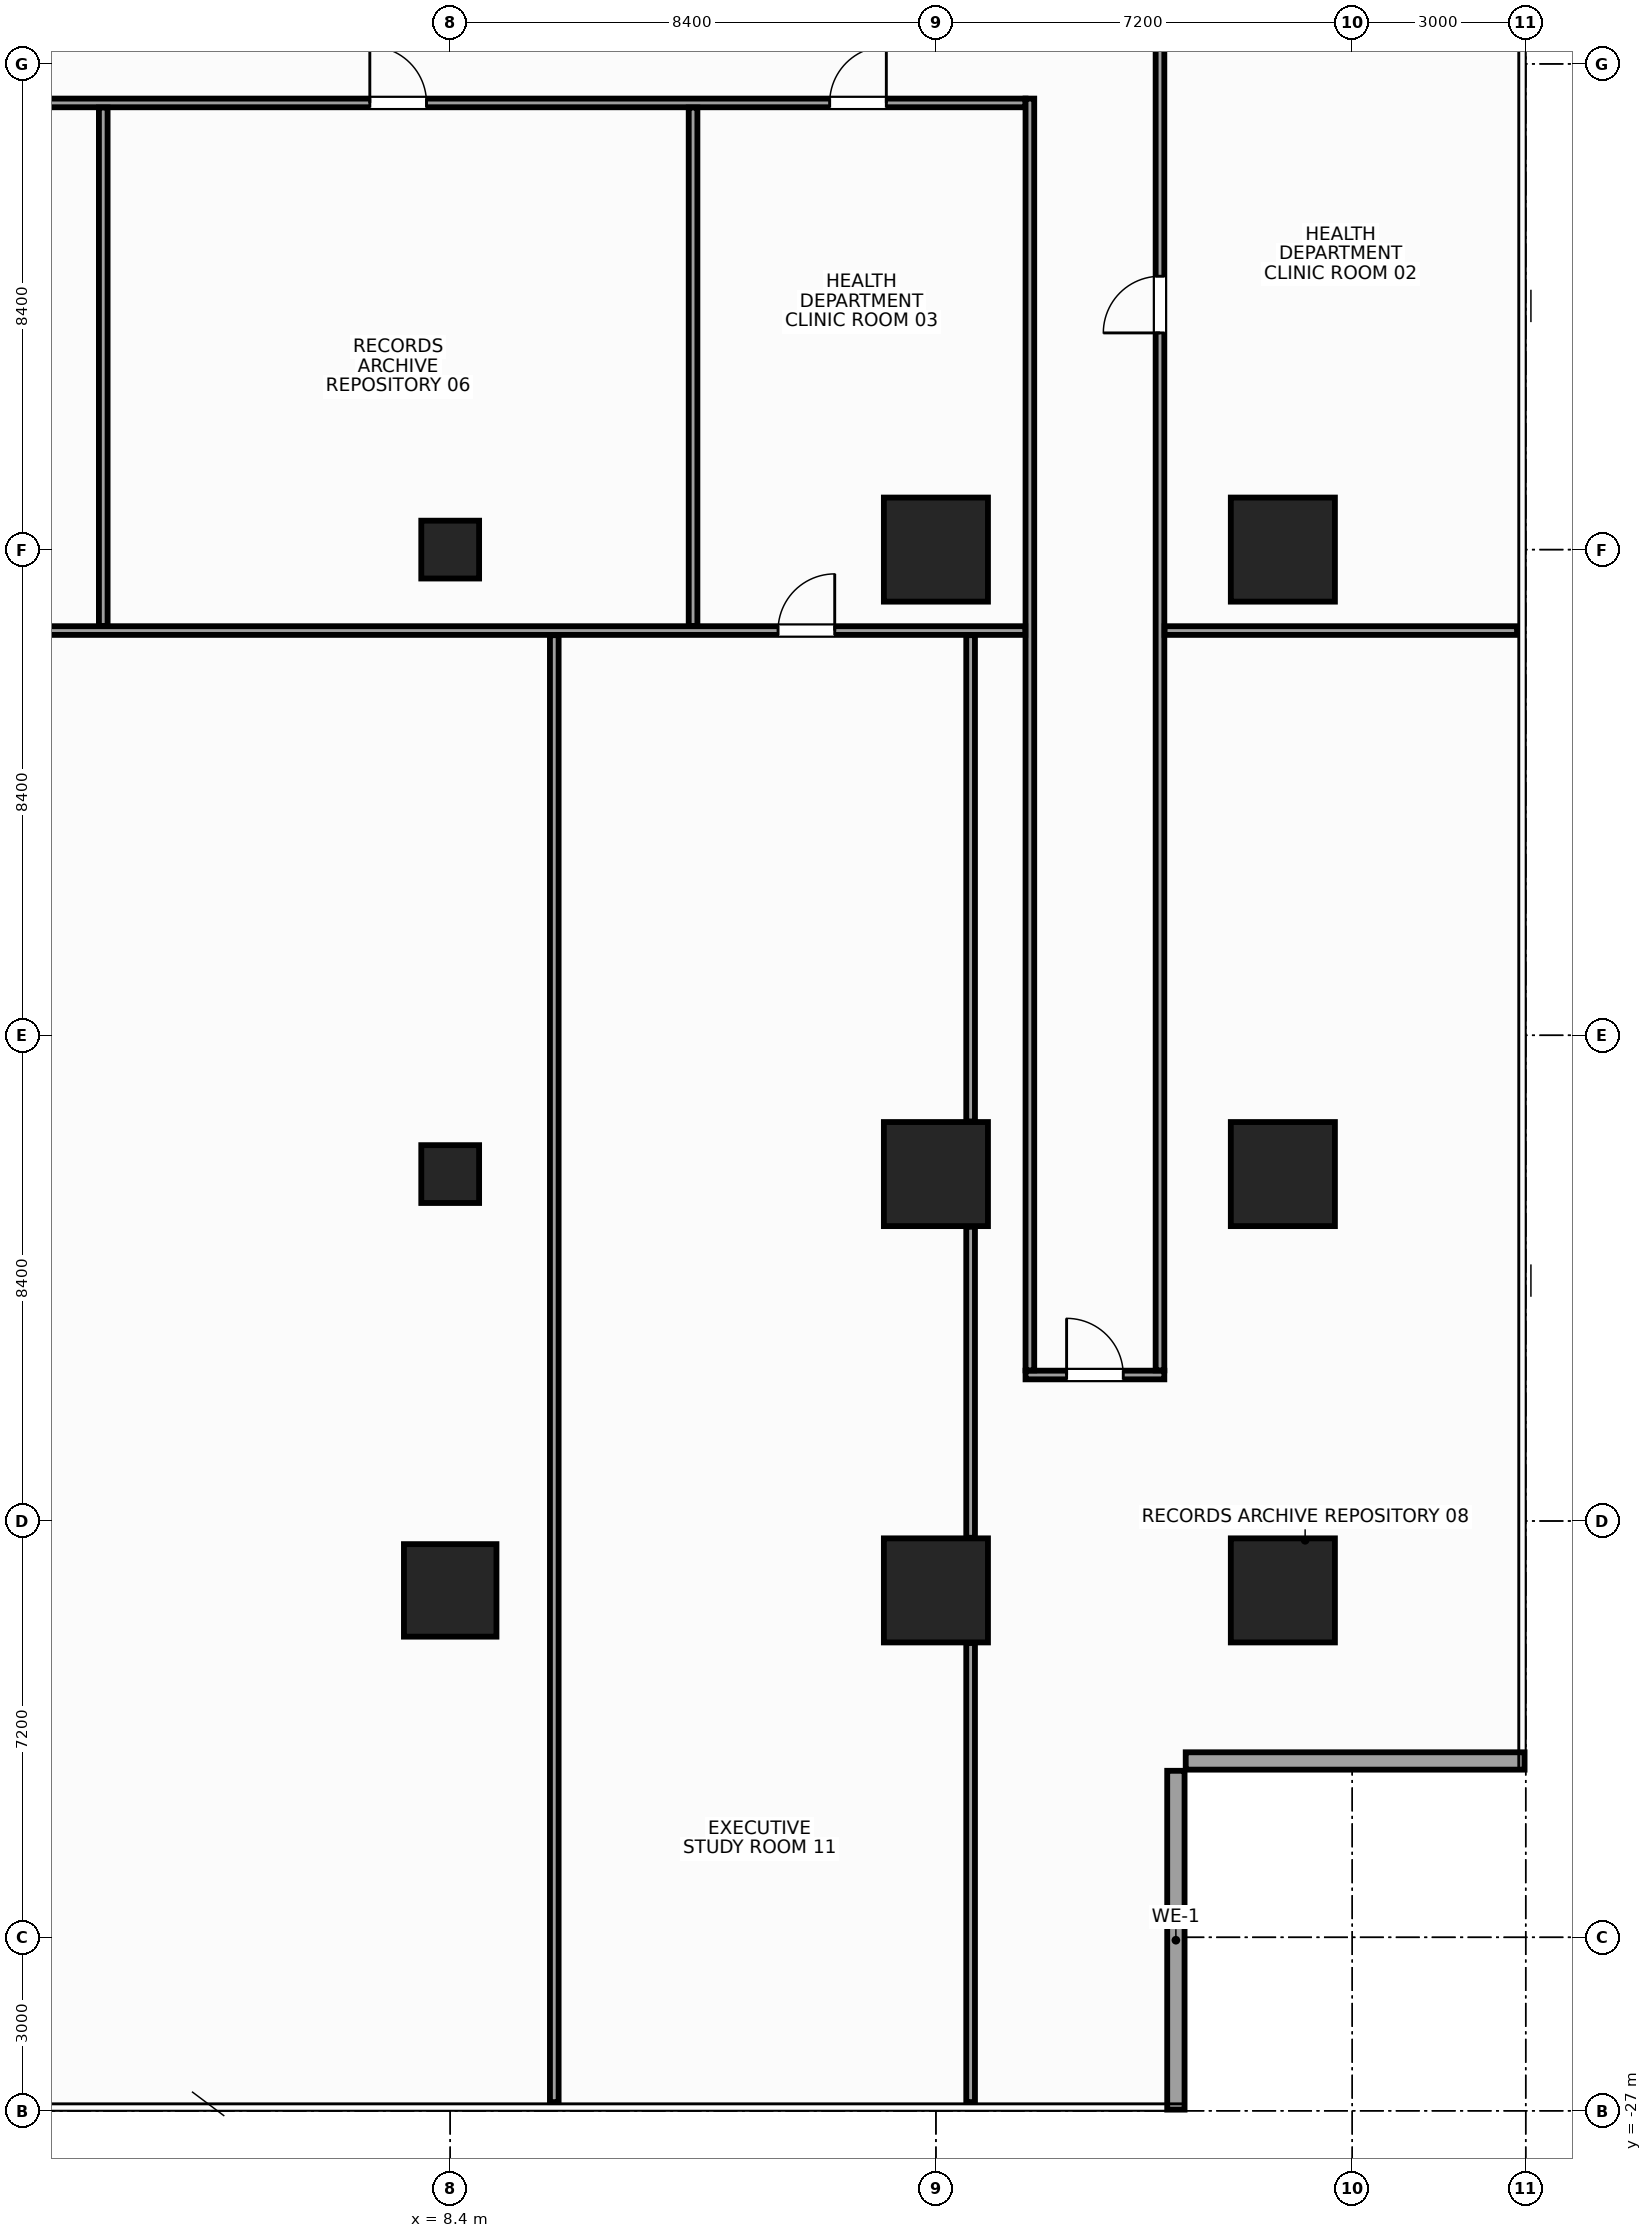
"""IFC4 building model, lengths in metres.
Left out: names, types, materials, properties, quantities, classifications, styles, units other than length and angle.
Written with IfcOpenShell. Run it as: python <this file> out.ifc"""

import sys

from ifc_helpers import new_model, si_unit, direction, frame, frame_2d, origin, origin_2d, place, context, subcontext, project, spatial, rectangle, hollow_rectangle, extrude, source, transform, mapped, element, fill, save


model = new_model("IFC4")
c1 = context("Model", 3, precision=1e-05, world=origin(), true_north=direction((0.0, 1.0)))
c2 = subcontext(c1, "Body", "Model", "MODEL_VIEW")
j1 = project(units=[si_unit("LENGTHUNIT", "METRE"), si_unit("PLANEANGLEUNIT", "RADIAN")], contexts=[c1])
p1 = place(None, origin())
s1 = spatial("IfcSite", under=j1, at=p1, CompositionType="ELEMENT")
p2 = place(p1, origin())
s2 = spatial("IfcBuilding", under=s1, at=p2, CompositionType="ELEMENT")
p3 = place(p2, frame((0.0, 0.0, 45.2)))
s3 = spatial("IfcBuildingStorey", under=s2, at=p3, CompositionType="ELEMENT", Elevation=45.2)
m1 = source(origin(), c2, "Body", "SweptSolid", [
    extrude(rectangle(XDim=1.8, YDim=1.8, at=origin_2d()), origin(), (0.0, 0.0, 1.0), 3.6),
])
for number, where, z_axis, x_axis in (
    (1, (16.8, -18.0, 0.0), (0.0, 0.0, 1.0), (1.0, 0.0, 0.0)),
    (2, (16.8, -10.8, 0.0), (0.0, 0.0, 1.0), (1.0, 0.0, 0.0)),
    (3, (16.8, 0.0, 0.0), (0.0, 0.0, 1.0), (1.0, 0.0, 0.0)),
    (4, (22.8, -18.0, 0.0), (0.0, 0.0, 1.0), (1.0, 0.0, 0.0)),
    (5, (22.8, -10.8, 0.0), (0.0, 0.0, 1.0), (1.0, 0.0, 0.0)),
    (6, (22.8, 0.0, 0.0), (0.0, 0.0, 1.0), (1.0, 0.0, 0.0)),
):
    element("IfcColumn", number, at=place(p3, frame(where, z_axis=z_axis, x_axis=x_axis)), inside=s3, PredefinedType="COLUMN", context=c2, shape_type="MappedRepresentation", body=[
        mapped(m1, transform((0.0, 0.0, 0.0), x_axis=(1.0, 0.0, 0.0), y_axis=(0.0, 1.0, 0.0), z_axis=(0.0, 0.0, 1.0), scale=1.0)),
    ])
m2 = source(origin(), c2, "Body", "SweptSolid", [
    extrude(rectangle(XDim=1.6, YDim=1.6, at=origin_2d()), origin(), (0.0, 0.0, 1.0), 3.6),
])
p4 = place(p3, frame((8.4, -18.0, 0.0), z_axis=(0.0, 0.0, 1.0), x_axis=(1.0, 0.0, 0.0)))
e7 = element("IfcColumn", 7, at=p4, inside=s3, PredefinedType="COLUMN", context=c2, shape_type="MappedRepresentation", body=[
    mapped(m2, transform((0.0, 0.0, 0.0), x_axis=(1.0, 0.0, 0.0), y_axis=(0.0, 1.0, 0.0), z_axis=(0.0, 0.0, 1.0), scale=1.0)),
])
m3 = source(origin(), c2, "Body", "SweptSolid", [
    extrude(hollow_rectangle(XDim=1.0, YDim=1.0, WallThickness=0.045, at=origin_2d()), origin(), (0.0, 0.0, 1.0), 3.6),
])
for number, where, z_axis, x_axis in (
    (8, (8.4, 0.0, 0.0), (0.0, 0.0, 1.0), (1.0, 0.0, 0.0)),
    (9, (8.4, -10.8, 0.0), (0.0, 0.0, 1.0), (1.0, 0.0, 0.0)),
):
    element("IfcColumn", number, at=place(p3, frame(where, z_axis=z_axis, x_axis=x_axis)), inside=s3, PredefinedType="COLUMN", context=c2, shape_type="MappedRepresentation", body=[
        mapped(m3, transform((0.0, 0.0, 0.0), x_axis=(1.0, 0.0, 0.0), y_axis=(0.0, 1.0, 0.0), z_axis=(0.0, 0.0, 1.0), scale=1.0)),
    ])
m4 = source(origin(), c2, "Body", "SweptSolid", [
    extrude(rectangle(XDim=5.86, YDim=0.3, at=frame_2d((2.93, 0.0))), origin(), (0.0, 0.0, 1.0), 2.74),
])
for number, where, z_axis, x_axis in (
    (10, (20.95, -26.98, 0.0), (0.0, 0.0, 1.0), (0.0, 1.0, 0.0)),
    (11, (21.12, -20.95, 0.0), (0.0, 0.0, 1.0), (1.0, 0.0, 0.0)),
):
    element("IfcWall", number, at=place(p3, frame(where, z_axis=z_axis, x_axis=x_axis)), inside=s3, PredefinedType="STANDARD", context=c2, shape_type="MappedRepresentation", body=[
        mapped(m4, transform((0.0, 0.0, 0.0), x_axis=(1.0, 0.0, 0.0), y_axis=(0.0, 1.0, 0.0), z_axis=(0.0, 0.0, 1.0), scale=1.0)),
    ])
m5 = source(origin(), c2, "Body", "SweptSolid", [
    extrude(rectangle(XDim=36.7, YDim=0.15, at=frame_2d((18.35, 0.0))), origin(), (0.0, 0.0, 1.0), 2.745),
])
p5 = place(p3, frame((-18.35, 7.725, 0.0), z_axis=(0.0, 0.0, 1.0), x_axis=(1.0, 0.0, 0.0)))
e12 = element("IfcWall", 12, at=p5, inside=s3, PredefinedType="PARTITIONING", context=c2, shape_type="MappedRepresentation", body=[
    mapped(m5, transform((0.0, 0.0, 0.0), x_axis=(1.0, 0.0, 0.0), y_axis=(0.0, 1.0, 0.0), z_axis=(0.0, 0.0, 1.0), scale=1.0)),
])
p6 = place(p5, frame((33.312, 0.0, 0.0)))
e13 = element("IfcOpeningElement", 13, at=p6, cuts=e12, PredefinedType="OPENING", context=c2, shape_type="SweptSolid", body=[
    extrude(rectangle(XDim=0.98, YDim=2.15, at=frame_2d((0.49, 1.075))), frame((0.0, 0.087, 0.0), z_axis=(0.0, -1.0, 0.0), x_axis=(1.0, 0.0, 0.0)), (0.0, 0.0, 1.0), 0.174),
])
p7 = place(p5, frame((4.107, 0.0, 0.0)))
e14 = element("IfcOpeningElement", 14, at=p7, cuts=e12, PredefinedType="OPENING", context=c2, shape_type="SweptSolid", body=[
    extrude(rectangle(XDim=0.98, YDim=2.15, at=frame_2d((0.49, 1.075))), frame((0.0, 0.087, 0.0), z_axis=(0.0, -1.0, 0.0), x_axis=(1.0, 0.0, 0.0)), (0.0, 0.0, 1.0), 0.174),
])
p8 = place(p5, frame((14.46, 0.0, 0.0)))
e15 = element("IfcOpeningElement", 15, at=p8, cuts=e12, PredefinedType="OPENING", context=c2, shape_type="SweptSolid", body=[
    extrude(rectangle(XDim=0.98, YDim=2.15, at=frame_2d((0.49, 1.075))), frame((0.0, 0.087, 0.0), z_axis=(0.0, -1.0, 0.0), x_axis=(1.0, 0.0, 0.0)), (0.0, 0.0, 1.0), 0.174),
])
p9 = place(p5, frame((25.36, 0.0, 0.0)))
e16 = element("IfcOpeningElement", 16, at=p9, cuts=e12, PredefinedType="OPENING", context=c2, shape_type="SweptSolid", body=[
    extrude(rectangle(XDim=0.98, YDim=2.15, at=frame_2d((0.49, 1.075))), frame((0.0, 0.087, 0.0), z_axis=(0.0, -1.0, 0.0), x_axis=(1.0, 0.0, 0.0)), (0.0, 0.0, 1.0), 0.174),
])
m6 = source(origin(), c2, "Body", "SweptSolid", [
    extrude(rectangle(XDim=2.4, YDim=0.15, at=frame_2d((1.2, 0.0))), origin(), (0.0, 0.0, 1.0), 2.895),
])
p10 = place(p3, frame((18.35, -14.275, 0.0), z_axis=(0.0, 0.0, 1.0), x_axis=(1.0, 0.0, 0.0)))
e17 = element("IfcWall", 17, at=p10, inside=s3, PredefinedType="PARTITIONING", context=c2, shape_type="MappedRepresentation", body=[
    mapped(m6, transform((0.0, 0.0, 0.0), x_axis=(1.0, 0.0, 0.0), y_axis=(0.0, 1.0, 0.0), z_axis=(0.0, 0.0, 1.0), scale=1.0)),
])
p11 = place(p10, frame((0.71, 0.0, 0.0)))
e18 = element("IfcOpeningElement", 18, at=p11, cuts=e17, PredefinedType="OPENING", context=c2, shape_type="SweptSolid", body=[
    extrude(rectangle(XDim=0.98, YDim=2.15, at=frame_2d((0.49, 1.075))), frame((0.0, 0.087, 0.0), z_axis=(0.0, -1.0, 0.0), x_axis=(1.0, 0.0, 0.0)), (0.0, 0.0, 1.0), 0.174),
])
m7 = source(origin(), c2, "Body", "SweptSolid", [
    extrude(rectangle(XDim=21.995, YDim=0.15, at=frame_2d((10.998, 0.0))), origin(), (0.0, 0.0, 1.0), 2.745),
])
p12 = place(p3, frame((18.425, -14.195, 0.0), z_axis=(0.0, 0.0, 1.0), x_axis=(0.0, 1.0, 0.0)))
e19 = element("IfcWall", 19, at=p12, inside=s3, PredefinedType="PARTITIONING", context=c2, shape_type="MappedRepresentation", body=[
    mapped(m7, transform((0.0, 0.0, 0.0), x_axis=(1.0, 0.0, 0.0), y_axis=(0.0, 1.0, 0.0), z_axis=(0.0, 0.0, 1.0), scale=1.0)),
])
m8 = source(origin(), c2, "Body", "SweptSolid", [
    extrude(rectangle(XDim=24.115, YDim=0.15, at=frame_2d((12.058, 0.0))), origin(), (0.0, 0.0, 1.0), 2.745),
])
p13 = place(p3, frame((20.675, -14.195, 0.0), z_axis=(0.0, 0.0, 1.0), x_axis=(0.0, 1.0, 0.0)))
e20 = element("IfcWall", 20, at=p13, inside=s3, PredefinedType="PARTITIONING", context=c2, shape_type="MappedRepresentation", body=[
    mapped(m8, transform((0.0, 0.0, 0.0), x_axis=(1.0, 0.0, 0.0), y_axis=(0.0, 1.0, 0.0), z_axis=(0.0, 0.0, 1.0), scale=1.0)),
])
p14 = place(p13, frame((17.942, 0.0, 0.0)))
e21 = element("IfcOpeningElement", 21, at=p14, cuts=e20, PredefinedType="OPENING", context=c2, shape_type="SweptSolid", body=[
    extrude(rectangle(XDim=0.98, YDim=2.15, at=frame_2d((0.49, 1.075))), frame((0.0, 0.087, 0.0), z_axis=(0.0, -1.0, 0.0), x_axis=(1.0, 0.0, 0.0)), (0.0, 0.0, 1.0), 0.174),
])
m9 = source(origin(), c2, "Body", "SweptSolid", [
    extrude(rectangle(XDim=36.69, YDim=0.15, at=frame_2d((18.345, 0.0))), origin(), (0.0, 0.0, 1.0), 2.745),
])
p15 = place(p3, frame((-18.345, -1.4, 0.0), z_axis=(0.0, 0.0, 1.0), x_axis=(1.0, 0.0, 0.0)))
e22 = element("IfcWall", 22, at=p15, inside=s3, PredefinedType="PARTITIONING", context=c2, shape_type="MappedRepresentation", body=[
    mapped(m9, transform((0.0, 0.0, 0.0), x_axis=(1.0, 0.0, 0.0), y_axis=(0.0, 1.0, 0.0), z_axis=(0.0, 0.0, 1.0), scale=1.0)),
])
p16 = place(p15, frame((14.455, 0.0, 0.0)))
e23 = element("IfcOpeningElement", 23, at=p16, cuts=e22, PredefinedType="OPENING", context=c2, shape_type="SweptSolid", body=[
    extrude(rectangle(XDim=0.98, YDim=2.15, at=frame_2d((0.49, 1.075))), frame((0.0, 0.087, 0.0), z_axis=(0.0, -1.0, 0.0), x_axis=(1.0, 0.0, 0.0)), (0.0, 0.0, 1.0), 0.174),
])
p17 = place(p15, frame((4.055, 0.0, 0.0)))
e24 = element("IfcOpeningElement", 24, at=p17, cuts=e22, PredefinedType="OPENING", context=c2, shape_type="SweptSolid", body=[
    extrude(rectangle(XDim=0.98, YDim=2.15, at=frame_2d((0.49, 1.075))), frame((0.0, 0.087, 0.0), z_axis=(0.0, -1.0, 0.0), x_axis=(1.0, 0.0, 0.0)), (0.0, 0.0, 1.0), 0.174),
])
p18 = place(p15, frame((32.415, 0.0, 0.0)))
e25 = element("IfcOpeningElement", 25, at=p18, cuts=e22, PredefinedType="OPENING", context=c2, shape_type="SweptSolid", body=[
    extrude(rectangle(XDim=0.98, YDim=2.15, at=frame_2d((0.49, 1.075))), frame((0.0, 0.087, 0.0), z_axis=(0.0, -1.0, 0.0), x_axis=(1.0, 0.0, 0.0)), (0.0, 0.0, 1.0), 0.174),
])
m10 = source(origin(), c2, "Body", "SweptSolid", [
    extrude(rectangle(XDim=6.095, YDim=0.15, at=frame_2d((3.048, 0.0))), origin(), (0.0, 0.0, 1.0), 2.745),
])
p19 = place(p3, frame((20.755, -1.4, 0.0), z_axis=(0.0, 0.0, 1.0), x_axis=(1.0, 0.0, 0.0)))
e26 = element("IfcWall", 26, at=p19, inside=s3, PredefinedType="PARTITIONING", context=c2, shape_type="MappedRepresentation", body=[
    mapped(m10, transform((0.0, 0.0, 0.0), x_axis=(1.0, 0.0, 0.0), y_axis=(0.0, 1.0, 0.0), z_axis=(0.0, 0.0, 1.0), scale=1.0)),
])
m11 = source(origin(), c2, "Body", "SweptSolid", [
    extrude(rectangle(XDim=8.965, YDim=0.15, at=frame_2d((4.482, 0.0))), origin(), (0.0, 0.0, 1.0), 2.645),
])
for number, where, z_axis, x_axis in (
    (27, (2.4, -1.32, 0.0), (0.0, 0.0, 1.0), (0.0, 1.0, 0.0)),
    (28, (12.6, -1.32, 0.0), (0.0, 0.0, 1.0), (0.0, 1.0, 0.0)),
):
    element("IfcWall", number, at=place(p3, frame(where, z_axis=z_axis, x_axis=x_axis)), inside=s3, PredefinedType="PARTITIONING", context=c2, shape_type="MappedRepresentation", body=[
        mapped(m11, transform((0.0, 0.0, 0.0), x_axis=(1.0, 0.0, 0.0), y_axis=(0.0, 1.0, 0.0), z_axis=(0.0, 0.0, 1.0), scale=1.0)),
    ])
m12 = source(origin(), c2, "Body", "SweptSolid", [
    extrude(rectangle(XDim=25.37, YDim=0.15, at=frame_2d((12.685, 0.0))), origin(), (0.0, 0.0, 1.0), 2.745),
])
p20 = place(p3, frame((10.2, -26.85, 0.0), z_axis=(0.0, 0.0, 1.0), x_axis=(0.0, 1.0, 0.0)))
e29 = element("IfcWall", 29, at=p20, inside=s3, PredefinedType="PARTITIONING", context=c2, shape_type="MappedRepresentation", body=[
    mapped(m12, transform((0.0, 0.0, 0.0), x_axis=(1.0, 0.0, 0.0), y_axis=(0.0, 1.0, 0.0), z_axis=(0.0, 0.0, 1.0), scale=1.0)),
])
m13 = source(origin(), c2, "Body", "SweptSolid", [
    extrude(rectangle(XDim=7.94, YDim=0.15, at=frame_2d((3.97, 0.0))), origin(), (0.0, 0.0, 1.0), 3.36),
])
p21 = place(p3, frame((17.4, -26.85, 0.0), z_axis=(0.0, 0.0, 1.0), x_axis=(0.0, 1.0, 0.0)))
e30 = element("IfcWall", 30, at=p21, inside=s3, PredefinedType="PARTITIONING", context=c2, shape_type="MappedRepresentation", body=[
    mapped(m13, transform((0.0, 0.0, 0.0), x_axis=(1.0, 0.0, 0.0), y_axis=(0.0, 1.0, 0.0), z_axis=(0.0, 0.0, 1.0), scale=1.0)),
])
m14 = source(origin(), c2, "Body", "SweptSolid", [
    extrude(rectangle(XDim=5.38, YDim=0.15, at=frame_2d((2.69, 0.0))), origin(), (0.0, 0.0, 1.0), 3.36),
])
p22 = place(p3, frame((17.4, -17.09, 0.0), z_axis=(0.0, 0.0, 1.0), x_axis=(0.0, 1.0, 0.0)))
e31 = element("IfcWall", 31, at=p22, inside=s3, PredefinedType="PARTITIONING", context=c2, shape_type="MappedRepresentation", body=[
    mapped(m14, transform((0.0, 0.0, 0.0), x_axis=(1.0, 0.0, 0.0), y_axis=(0.0, 1.0, 0.0), z_axis=(0.0, 0.0, 1.0), scale=1.0)),
])
m15 = source(origin(), c2, "Body", "SweptSolid", [
    extrude(rectangle(XDim=8.41, YDim=0.15, at=frame_2d((4.205, 0.0))), origin(), (0.0, 0.0, 1.0), 3.36),
])
p23 = place(p3, frame((17.4, -9.89, 0.0), z_axis=(0.0, 0.0, 1.0), x_axis=(0.0, 1.0, 0.0)))
e32 = element("IfcWall", 32, at=p23, inside=s3, PredefinedType="PARTITIONING", context=c2, shape_type="MappedRepresentation", body=[
    mapped(m15, transform((0.0, 0.0, 0.0), x_axis=(1.0, 0.0, 0.0), y_axis=(0.0, 1.0, 0.0), z_axis=(0.0, 0.0, 1.0), scale=1.0)),
])
m16 = source(origin(), c2, "Body", "SweptSolid", [
    extrude(rectangle(XDim=0.98, YDim=2.15, at=frame_2d((0.49, 1.075))), frame((0.0, 0.025, 0.0), z_axis=(0.0, -1.0, 0.0), x_axis=(1.0, 0.0, 0.0)), (0.0, 0.0, 1.0), 0.05),
])
p24 = place(p14, origin())
e33 = element("IfcDoor", 33, at=p24, inside=s3, OperationType="SINGLE_SWING_LEFT", PredefinedType="DOOR", context=c2, shape_type="MappedRepresentation", body=[
    mapped(m16, transform((0.0, 0.0, 0.0), x_axis=(1.0, 0.0, 0.0), y_axis=(0.0, 1.0, 0.0), z_axis=(0.0, 0.0, 1.0), scale=1.0)),
])
fill(e21, e33)
p25 = place(p6, origin())
e34 = element("IfcDoor", 34, at=p25, inside=s3, OperationType="SINGLE_SWING_RIGHT", PredefinedType="DOOR", context=c2, shape_type="MappedRepresentation", body=[
    mapped(m16, transform((0.0, 0.0, 0.0), x_axis=(1.0, 0.0, 0.0), y_axis=(0.0, 1.0, 0.0), z_axis=(0.0, 0.0, 1.0), scale=1.0)),
])
fill(e13, e34)
p26 = place(p9, origin())
e35 = element("IfcDoor", 35, at=p26, inside=s3, OperationType="SINGLE_SWING_LEFT", PredefinedType="DOOR", context=c2, shape_type="MappedRepresentation", body=[
    mapped(m16, transform((0.0, 0.0, 0.0), x_axis=(1.0, 0.0, 0.0), y_axis=(0.0, 1.0, 0.0), z_axis=(0.0, 0.0, 1.0), scale=1.0)),
])
fill(e16, e35)
p27 = place(p11, origin())
e36 = element("IfcDoor", 36, at=p27, inside=s3, OperationType="SINGLE_SWING_LEFT", PredefinedType="DOOR", context=c2, shape_type="MappedRepresentation", body=[
    mapped(m16, transform((0.0, 0.0, 0.0), x_axis=(1.0, 0.0, 0.0), y_axis=(0.0, 1.0, 0.0), z_axis=(0.0, 0.0, 1.0), scale=1.0)),
])
fill(e18, e36)
p28 = place(p18, origin())
e37 = element("IfcDoor", 37, at=p28, inside=s3, OperationType="SINGLE_SWING_RIGHT", PredefinedType="DOOR", context=c2, shape_type="MappedRepresentation", body=[
    mapped(m16, transform((0.0, 0.0, 0.0), x_axis=(1.0, 0.0, 0.0), y_axis=(0.0, 1.0, 0.0), z_axis=(0.0, 0.0, 1.0), scale=1.0)),
])
fill(e25, e37)
save(model, sys.argv[1])
